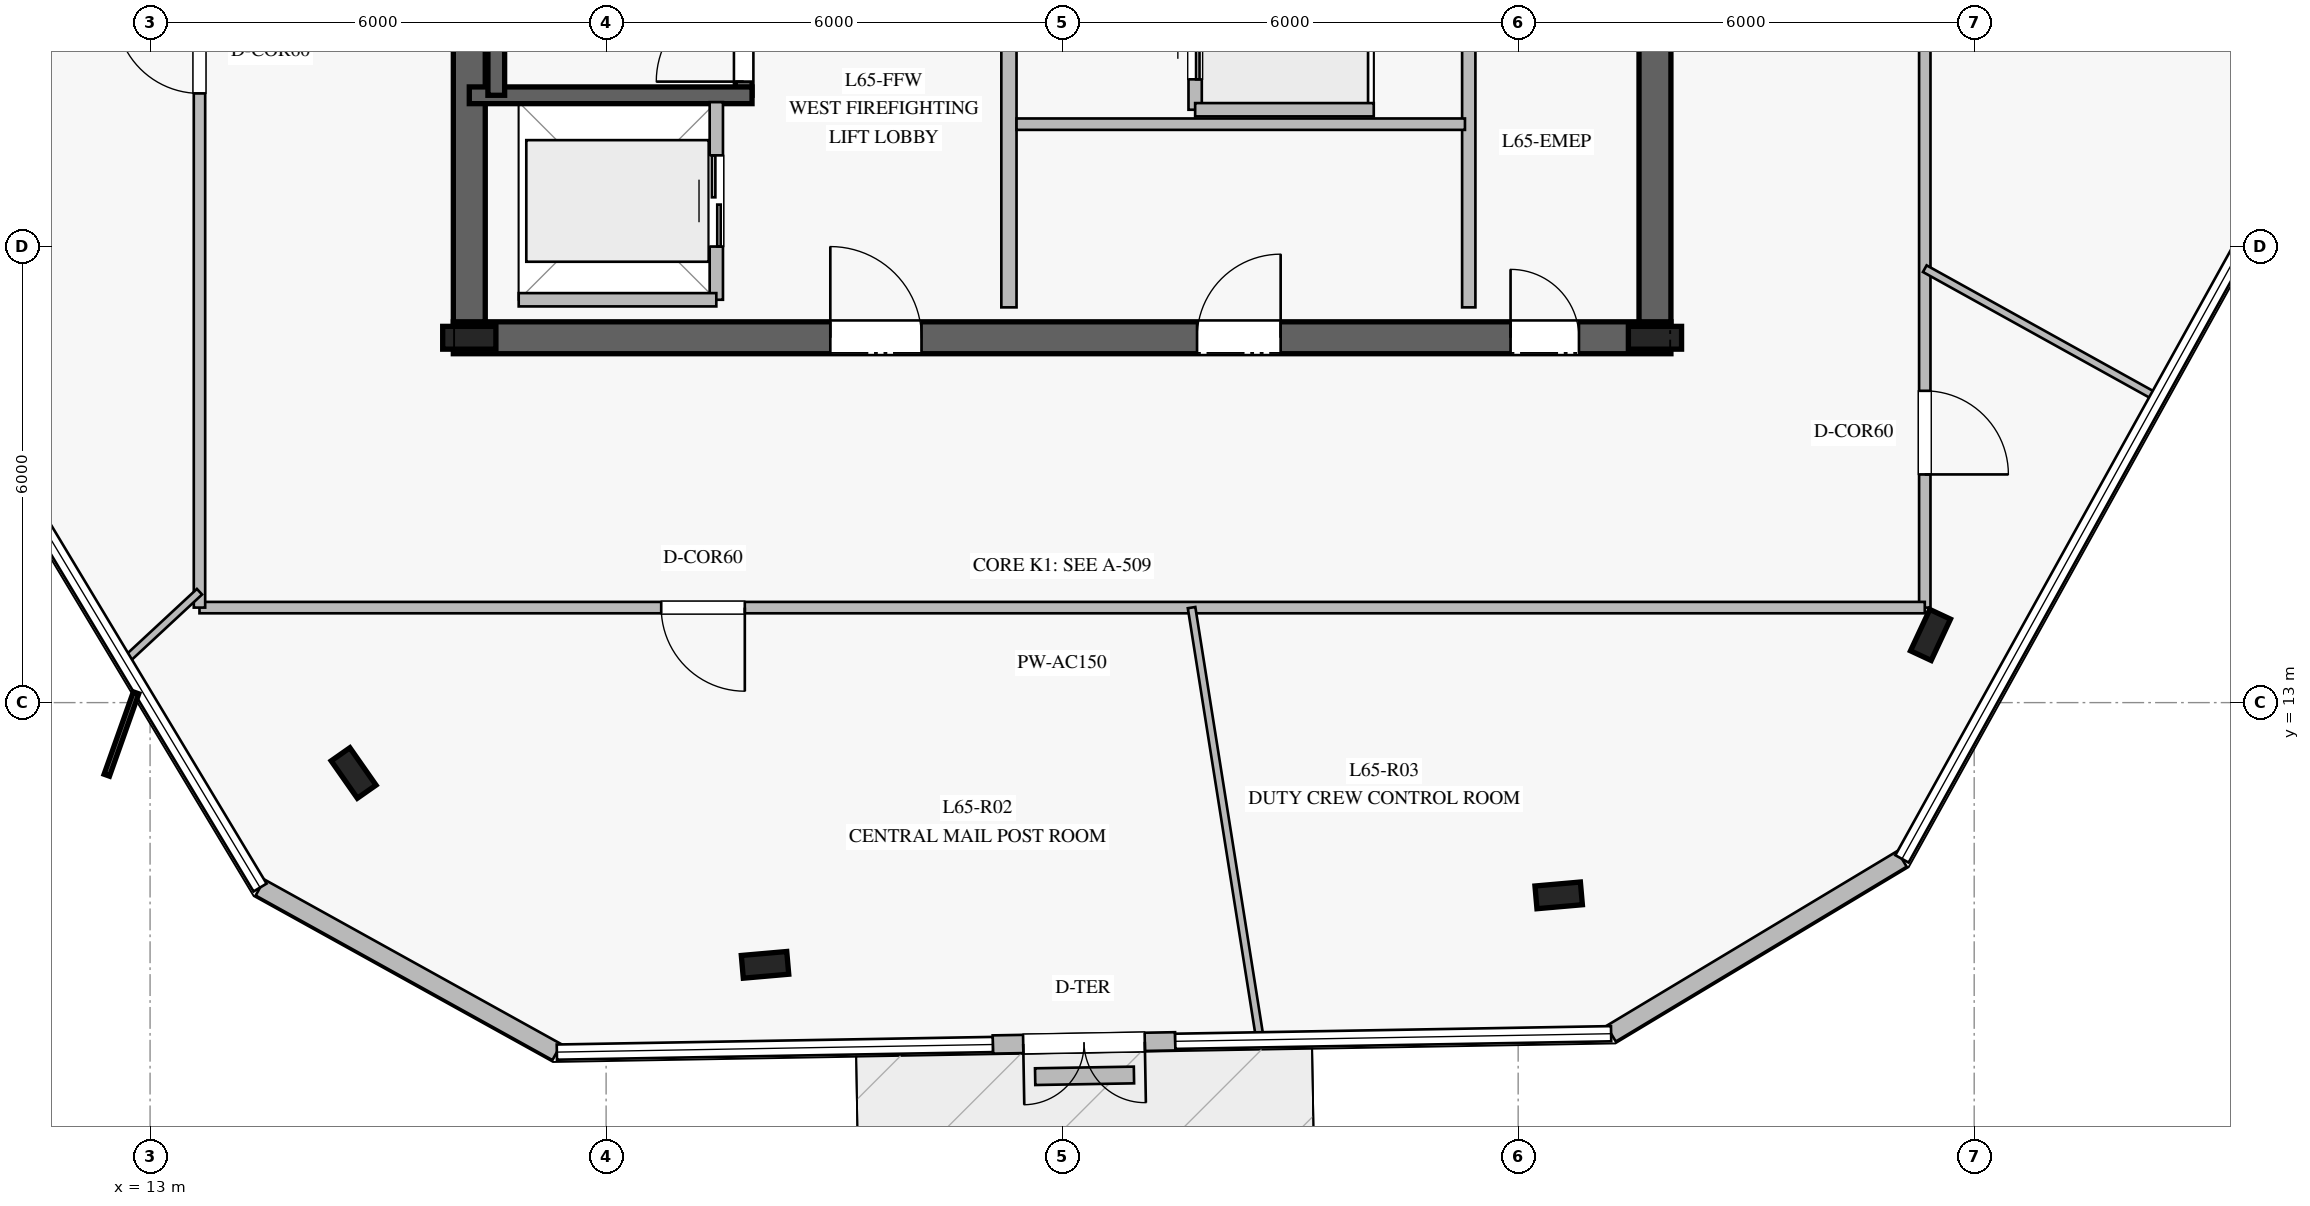
"""IFC4 building model, lengths in metres.
Left out: names, types, materials, properties, quantities, classifications, styles, units other than length and angle.
Written with IfcOpenShell. Run it as: python <this file> out.ifc"""

import sys

from ifc_helpers import new_model, si_unit, direction, frame, frame_2d, origin, origin_2d, place, context, subcontext, project, spatial, rectangle, i_section, extrude, element, fill, save


model = new_model("IFC4")
c1 = context("Model", 3, precision=1e-05, world=origin(), true_north=direction((0.0, 1.0)))
c2 = subcontext(c1, "Body", "Model", "MODEL_VIEW")
j1 = project(units=[si_unit("LENGTHUNIT", "METRE"), si_unit("PLANEANGLEUNIT", "RADIAN")], contexts=[c1])
p1 = place(None, origin())
s1 = spatial("IfcSite", under=j1, at=p1, CompositionType="ELEMENT")
p2 = place(p1, origin())
s2 = spatial("IfcBuilding", under=s1, at=p2, CompositionType="ELEMENT")
p3 = place(p2, frame((0.0, 0.0, 270.2)))
s3 = spatial("IfcBuildingStorey", under=s2, at=p3, CompositionType="ELEMENT", Elevation=270.2)
p4 = place(p3, frame((16.99, 17.8, 0.0), z_axis=(0.0, 0.0, 1.0), x_axis=(1.0, 0.0, 0.0)))
e1 = element("IfcWall", 1, at=p4, inside=s3, PredefinedType="SHEAR", context=c2, shape_type="SweptSolid", body=[
    extrude(rectangle(XDim=16.02, YDim=0.42, at=frame_2d((8.01, 0.0))), origin(), (0.0, 0.0, 1.0), 3.78),
])
p5 = place(p4, frame((4.96, 0.0, 0.0)))
e2 = element("IfcOpeningElement", 2, at=p5, cuts=e1, PredefinedType="OPENING", context=c2, shape_type="SweptSolid", body=[
    extrude(rectangle(XDim=1.2, YDim=2.25, at=frame_2d((0.6, 1.125))), frame((0.0, 0.22, 0.0), z_axis=(0.0, -1.0, 0.0), x_axis=(1.0, 0.0, 0.0)), (0.0, 0.0, 1.0), 0.44),
])
p6 = place(p4, frame((13.91, 0.0, 0.0)))
e3 = element("IfcOpeningElement", 3, at=p6, cuts=e1, PredefinedType="OPENING", context=c2, shape_type="SweptSolid", body=[
    extrude(rectangle(XDim=0.9, YDim=2.1, at=frame_2d((0.45, 1.05))), frame((0.0, 0.22, 0.0), z_axis=(0.0, -1.0, 0.0), x_axis=(1.0, 0.0, 0.0)), (0.0, 0.0, 1.0), 0.44),
])
p7 = place(p4, frame((9.785, 0.0, 0.0)))
e4 = element("IfcOpeningElement", 4, at=p7, cuts=e1, PredefinedType="OPENING", context=c2, shape_type="SweptSolid", body=[
    extrude(rectangle(XDim=1.1, YDim=2.2, at=frame_2d((0.55, 1.1))), frame((0.0, 0.22, 0.0), z_axis=(0.0, -1.0, 0.0), x_axis=(1.0, 0.0, 0.0)), (0.0, 0.0, 1.0), 0.44),
])
p8 = place(p3, frame((17.2, 31.99, 0.0), z_axis=(0.0, 0.0, 1.0), x_axis=(0.0, -1.0, 0.0)))
e5 = element("IfcWall", 5, at=p8, inside=s3, PredefinedType="SHEAR", context=c2, shape_type="SweptSolid", body=[
    extrude(rectangle(XDim=13.98, YDim=0.42, at=frame_2d((6.99, 0.0))), origin(), (0.0, 0.0, 1.0), 3.78),
])
p9 = place(p8, frame((2.14, 0.0, 0.0)))
e6 = element("IfcOpeningElement", 6, at=p9, cuts=e5, PredefinedType="OPENING", context=c2, shape_type="SweptSolid", body=[
    extrude(rectangle(XDim=1.5, YDim=2.2, at=frame_2d((0.75, 1.1))), frame((0.0, 0.22, 0.0), z_axis=(0.0, -1.0, 0.0), x_axis=(1.0, 0.0, 0.0)), (0.0, 0.0, 1.0), 0.44),
])
p10 = place(p3, frame((32.8, 18.01, 0.0), z_axis=(0.0, 0.0, 1.0), x_axis=(0.0, 1.0, 0.0)))
e7 = element("IfcWall", 7, at=p10, inside=s3, PredefinedType="SHEAR", context=c2, shape_type="SweptSolid", body=[
    extrude(rectangle(XDim=13.98, YDim=0.42, at=frame_2d((6.99, 0.0))), origin(), (0.0, 0.0, 1.0), 3.78),
])
for number, where, z_axis, x_axis in (
    (8, (17.2, 17.8, 0.0), (0.0, 0.0, 1.0), (1.0, 0.0, 0.0)),
    (9, (32.8, 17.8, 0.0), (0.0, 0.0, 1.0), (1.0, 0.0, 0.0)),
):
    element("IfcColumn", number, at=place(p3, frame(where, z_axis=z_axis, x_axis=x_axis)), inside=s3, PredefinedType="COLUMN", context=c2, shape_type="SweptSolid", body=[
        extrude(i_section(OverallWidth=0.3, OverallDepth=0.7, WebThickness=0.017, FlangeThickness=0.032, at=origin_2d()), origin(), (0.0, 0.0, 1.0), 4.0),
    ])
p11 = place(p3, frame((20.81, 20.99, 0.0), z_axis=(0.0, 0.0, 1.0), x_axis=(0.0, 1.0, 0.0)))
e10 = element("IfcWall", 10, at=p11, inside=s3, PredefinedType="SOLIDWALL", context=c2, shape_type="SweptSolid", body=[
    extrude(rectangle(XDim=7.22, YDim=0.22, at=frame_2d((3.61, 0.0))), origin(), (0.0, 0.0, 1.0), 3.78),
])
p12 = place(p11, frame((0.18, 0.0, 0.0)))
e11 = element("IfcOpeningElement", 11, at=p12, cuts=e10, PredefinedType="OPENING", context=c2, shape_type="SweptSolid", body=[
    extrude(rectangle(XDim=1.15, YDim=2.2, at=frame_2d((0.575, 1.1))), frame((0.0, 0.12, 0.0), z_axis=(0.0, -1.0, 0.0), x_axis=(1.0, 0.0, 0.0)), (0.0, 0.0, 1.0), 0.24),
])
p13 = place(p3, frame((17.2, 20.99, 0.0), z_axis=(0.0, 0.0, 1.0), x_axis=(1.0, 0.0, 0.0)))
e12 = element("IfcWall", 12, at=p13, inside=s3, PredefinedType="SOLIDWALL", context=c2, shape_type="SweptSolid", body=[
    extrude(rectangle(XDim=3.72, YDim=0.22, at=frame_2d((1.86, 0.0))), origin(), (0.0, 0.0, 1.0), 3.78),
])
p14 = place(p3, frame((17.555, 28.21, 0.0), z_axis=(0.0, 0.0, 1.0), x_axis=(0.0, -1.0, 0.0)))
e13 = element("IfcWall", 13, at=p14, inside=s3, PredefinedType="SOLIDWALL", context=c2, shape_type="SweptSolid", body=[
    extrude(rectangle(XDim=7.22, YDim=0.22, at=frame_2d((3.61, 0.0))), origin(), (0.0, 0.0, 1.0), 3.78),
])
for number, where, z_axis, x_axis in (
    (14, (15.678, 12.074, 0.0), (0.0, 0.0, 1.0), (-0.574, 0.819, 0.0)),
    (15, (21.091, 9.55, 0.0), (0.0, 0.0, 1.0), (0.996, 0.087, 0.0)),
    (16, (31.533, 10.464, 0.0), (0.0, 0.0, 1.0), (0.996, 0.087, 0.0)),
    (17, (36.425, 13.89, 0.0), (0.0, 0.0, 1.0), (0.423, 0.906, 0.0)),
):
    element("IfcColumn", number, at=place(p3, frame(where, z_axis=z_axis, x_axis=x_axis)), inside=s3, PredefinedType="COLUMN", context=c2, shape_type="SweptSolid", body=[
        extrude(i_section(OverallWidth=0.3, OverallDepth=0.6, WebThickness=0.015, FlangeThickness=0.03, at=origin_2d()), origin(), (0.0, 0.0, 1.0), 4.0),
    ])
p15 = place(p3, frame((14.447, 10.567, 0.0), z_axis=(0.0, 0.0, 1.0), x_axis=(0.874600538514, -0.48484419975, 0.0)))
e18 = element("IfcWall", 18, at=p15, inside=s3, PredefinedType="STANDARD", context=c2, shape_type="SweptSolid", body=[
    extrude(rectangle(XDim=4.465, YDim=0.24, at=frame_2d((2.232, 0.0))), origin(), (0.0, 0.0, 1.0), 3.78),
])
p16 = place(p3, frame((24.088, 8.502, 0.0), z_axis=(0.0, 0.0, 1.0), x_axis=(0.999846985771, 0.017492999853, 0.0)))
e19 = element("IfcWall", 19, at=p16, inside=s3, PredefinedType="STANDARD", context=c2, shape_type="SweptSolid", body=[
    extrude(rectangle(XDim=2.401, YDim=0.24, at=frame_2d((1.2, 0.0))), origin(), (0.0, 0.0, 1.0), 3.78),
])
p17 = place(p16, frame((0.4, 0.0, 0.0)))
e20 = element("IfcOpeningElement", 20, at=p17, cuts=e19, PredefinedType="OPENING", context=c2, shape_type="SweptSolid", body=[
    extrude(rectangle(XDim=1.6, YDim=2.25, at=frame_2d((0.8, 1.125))), frame((0.0, 0.13, 0.0), z_axis=(0.0, -1.0, 0.0), x_axis=(1.0, 0.0, 0.0)), (0.0, 0.0, 1.0), 0.26),
])
p18 = place(p3, frame((32.223, 8.644, 0.0), z_axis=(0.0, 0.0, 1.0), x_axis=(0.857121218243, 0.515114761231, 0.0)))
e21 = element("IfcWall", 21, at=p18, inside=s3, PredefinedType="STANDARD", context=c2, shape_type="SweptSolid", body=[
    extrude(rectangle(XDim=4.465, YDim=0.24, at=frame_2d((2.232, 0.0))), origin(), (0.0, 0.0, 1.0), 3.78),
])
p19 = place(p3, frame((24.645, 8.079, 0.0), z_axis=(0.0, 0.0, 1.0), x_axis=(0.999857201789, 0.01689899496, 0.0)))
e22 = element("IfcWall", 22, at=p19, inside=s3, PredefinedType="USERDEFINED", context=c2, shape_type="SweptSolid", body=[
    extrude(rectangle(XDim=1.3, YDim=0.22, at=frame_2d((0.65, 0.0))), origin(), (0.0, 0.0, 1.0), 0.4),
])
p20 = place(p3, frame((24.3, 18.2, 0.0), z_axis=(0.0, 0.0, 1.0), x_axis=(0.0, 1.0, 0.0)))
e23 = element("IfcWall", 23, at=p20, inside=s3, PredefinedType="PARTITIONING", context=c2, shape_type="SweptSolid", body=[
    extrude(rectangle(XDim=5.15, YDim=0.2, at=frame_2d((2.575, 0.0))), origin(), (0.0, 0.0, 1.0), 3.78),
])
p21 = place(p3, frame((30.35, 18.2, 0.0), z_axis=(0.0, 0.0, 1.0), x_axis=(0.0, 1.0, 0.0)))
e24 = element("IfcWall", 24, at=p21, inside=s3, PredefinedType="PARTITIONING", context=c2, shape_type="SweptSolid", body=[
    extrude(rectangle(XDim=3.48, YDim=0.175, at=frame_2d((1.74, 0.0))), origin(), (0.0, 0.0, 1.0), 3.78),
])
p22 = place(p3, frame((24.4, 20.61, 0.0), z_axis=(0.0, 0.0, 1.0), x_axis=(1.0, 0.0, 0.0)))
e25 = element("IfcWall", 25, at=p22, inside=s3, PredefinedType="PARTITIONING", context=c2, shape_type="SweptSolid", body=[
    extrude(rectangle(XDim=5.9, YDim=0.15, at=frame_2d((2.95, 0.0))), origin(), (0.0, 0.0, 1.0), 3.78),
])
p23 = place(p3, frame((26.75, 20.8, 0.0), z_axis=(0.0, 0.0, 1.0), x_axis=(0.0, 1.0, 0.0)))
e26 = element("IfcWall", 26, at=p23, inside=s3, PredefinedType="PARTITIONING", context=c2, shape_type="SweptSolid", body=[
    extrude(rectangle(XDim=1.9, YDim=0.175, at=frame_2d((0.95, 0.0))), origin(), (0.0, 0.0, 1.0), 3.78),
])
p24 = place(p23, frame((0.4, 0.0, 0.0)))
e27 = element("IfcOpeningElement", 27, at=p24, cuts=e26, PredefinedType="OPENING", context=c2, shape_type="SweptSolid", body=[
    extrude(rectangle(XDim=1.1, YDim=2.2, at=frame_2d((0.55, 1.1))), frame((0.0, 0.098, 0.0), z_axis=(0.0, -1.0, 0.0), x_axis=(1.0, 0.0, 0.0)), (0.0, 0.0, 1.0), 0.195),
])
p25 = place(p3, frame((26.75, 20.8, 0.0), z_axis=(0.0, 0.0, 1.0), x_axis=(1.0, 0.0, 0.0)))
e28 = element("IfcWall", 28, at=p25, inside=s3, PredefinedType="PARTITIONING", context=c2, shape_type="SweptSolid", body=[
    extrude(rectangle(XDim=2.35, YDim=0.175, at=frame_2d((1.175, 0.0))), origin(), (0.0, 0.0, 1.0), 3.78),
])
p26 = place(p3, frame((20.45, 18.3, 0.0), z_axis=(0.0, 0.0, 1.0), x_axis=(0.0, 1.0, 0.0)))
e29 = element("IfcWall", 29, at=p26, inside=s3, PredefinedType="PARTITIONING", context=c2, shape_type="SweptSolid", body=[
    extrude(rectangle(XDim=2.6, YDim=0.175, at=frame_2d((1.3, 0.0))), origin(), (0.0, 0.0, 1.0), 3.78),
])
p27 = place(p26, frame((0.7, 0.0, 0.0)))
e30 = element("IfcOpeningElement", 30, at=p27, cuts=e29, PredefinedType="OPENING", context=c2, shape_type="SweptSolid", body=[
    extrude(rectangle(XDim=1.2, YDim=2.2, at=frame_2d((0.6, 1.1))), frame((0.0, 0.098, 0.0), z_axis=(0.0, -1.0, 0.0), x_axis=(1.0, 0.0, 0.0)), (0.0, 0.0, 1.0), 0.195),
])
p28 = place(p3, frame((17.85, 18.3, 0.0), z_axis=(0.0, 0.0, 1.0), x_axis=(1.0, 0.0, 0.0)))
e31 = element("IfcWall", 31, at=p28, inside=s3, PredefinedType="PARTITIONING", context=c2, shape_type="SweptSolid", body=[
    extrude(rectangle(XDim=2.6, YDim=0.175, at=frame_2d((1.3, 0.0))), origin(), (0.0, 0.0, 1.0), 3.78),
])
p29 = place(p3, frame((36.35, 35.75, 0.0), z_axis=(0.0, 0.0, 1.0), x_axis=(0.0, -1.0, 0.0)))
e32 = element("IfcWall", 32, at=p29, inside=s3, PredefinedType="PARTITIONING", context=c2, shape_type="SweptSolid", body=[
    extrude(rectangle(XDim=21.5, YDim=0.15, at=frame_2d((10.75, 0.0))), origin(), (0.0, 0.0, 1.0), 3.25),
])
p30 = place(p29, frame((18.648, 0.0, 0.0)))
e33 = element("IfcOpeningElement", 33, at=p30, cuts=e32, PredefinedType="OPENING", context=c2, shape_type="SweptSolid", body=[
    extrude(rectangle(XDim=1.1, YDim=2.2, at=frame_2d((0.55, 1.1))), frame((0.0, 0.085, 0.0), z_axis=(0.0, -1.0, 0.0), x_axis=(1.0, 0.0, 0.0)), (0.0, 0.0, 1.0), 0.17),
])
p31 = place(p29, frame((9.933, 0.0, 0.0)))
e34 = element("IfcOpeningElement", 34, at=p31, cuts=e32, PredefinedType="OPENING", context=c2, shape_type="SweptSolid", body=[
    extrude(rectangle(XDim=1.1, YDim=2.2, at=frame_2d((0.55, 1.1))), frame((0.0, 0.085, 0.0), z_axis=(0.0, -1.0, 0.0), x_axis=(1.0, 0.0, 0.0)), (0.0, 0.0, 1.0), 0.17),
])
p32 = place(p3, frame((36.35, 14.25, 0.0), z_axis=(0.0, 0.0, 1.0), x_axis=(-1.0, 0.0, 0.0)))
e35 = element("IfcWall", 35, at=p32, inside=s3, PredefinedType="PARTITIONING", context=c2, shape_type="SweptSolid", body=[
    extrude(rectangle(XDim=22.7, YDim=0.15, at=frame_2d((11.35, 0.0))), origin(), (0.0, 0.0, 1.0), 3.28),
])
p33 = place(p32, frame((15.525, 0.0, 0.0)))
e36 = element("IfcOpeningElement", 36, at=p33, cuts=e35, PredefinedType="OPENING", context=c2, shape_type="SweptSolid", body=[
    extrude(rectangle(XDim=1.1, YDim=2.2, at=frame_2d((0.55, 1.1))), frame((0.0, 0.085, 0.0), z_axis=(0.0, -1.0, 0.0), x_axis=(1.0, 0.0, 0.0)), (0.0, 0.0, 1.0), 0.17),
])
p34 = place(p3, frame((13.65, 14.25, 0.0), z_axis=(0.0, 0.0, 1.0), x_axis=(0.0, 1.0, 0.0)))
e37 = element("IfcWall", 37, at=p34, inside=s3, PredefinedType="PARTITIONING", context=c2, shape_type="SweptSolid", body=[
    extrude(rectangle(XDim=21.5, YDim=0.15, at=frame_2d((10.75, 0.0))), origin(), (0.0, 0.0, 1.0), 3.25),
])
p35 = place(p34, frame((6.765, 0.0, 0.0)))
e38 = element("IfcOpeningElement", 38, at=p35, cuts=e37, PredefinedType="OPENING", context=c2, shape_type="SweptSolid", body=[
    extrude(rectangle(XDim=1.1, YDim=2.2, at=frame_2d((0.55, 1.1))), frame((0.0, 0.085, 0.0), z_axis=(0.0, -1.0, 0.0), x_axis=(1.0, 0.0, 0.0)), (0.0, 0.0, 1.0), 0.17),
])
p36 = place(p3, frame((13.65, 14.459, 0.0), z_axis=(0.0, 0.0, 1.0), x_axis=(-0.732786974923, -0.680458117288, 0.0)))
e39 = element("IfcWall", 39, at=p36, inside=s3, PredefinedType="MOVABLE", context=c2, shape_type="SweptSolid", body=[
    extrude(rectangle(XDim=1.334, YDim=0.1, at=frame_2d((0.667, 0.0))), origin(), (0.0, 0.0, 1.0), 3.28),
])
p37 = place(p3, frame((26.703, 14.25, 0.0), z_axis=(0.0, 0.0, 1.0), x_axis=(0.156602299035, -0.987661743684, 0.0)))
e40 = element("IfcWall", 40, at=p37, inside=s3, PredefinedType="MOVABLE", context=c2, shape_type="SweptSolid", body=[
    extrude(rectangle(XDim=5.742, YDim=0.1, at=frame_2d((2.871, 0.0))), origin(), (0.0, 0.0, 1.0), 3.28),
])
p38 = place(p3, frame((36.35, 18.709, 0.0), z_axis=(0.0, 0.0, 1.0), x_axis=(0.874507187931, -0.485012554741, 0.0)))
e41 = element("IfcWall", 41, at=p38, inside=s3, PredefinedType="MOVABLE", context=c2, shape_type="SweptSolid", body=[
    extrude(rectangle(XDim=3.486, YDim=0.1, at=frame_2d((1.743, 0.0))), origin(), (0.0, 0.0, 1.0), 3.28),
])
p39 = place(p17, frame((1.6, 0.0, 0.0), z_axis=(0.0, 0.0, 1.0), x_axis=(-1.0, 0.0, 0.0)))
e42 = element("IfcDoor", 42, at=p39, inside=s3, OperationType="DOUBLE_DOOR_SINGLE_SWING", PredefinedType="DOOR", context=c2, shape_type="SweptSolid", body=[
    extrude(rectangle(XDim=1.6, YDim=2.25, at=frame_2d((0.8, 1.125))), frame((0.0, 0.025, 0.0), z_axis=(0.0, -1.0, 0.0), x_axis=(1.0, 0.0, 0.0)), (0.0, 0.0, 1.0), 0.05),
])
fill(e20, e42)
p40 = place(p12, origin())
e43 = element("IfcDoor", 43, at=p40, inside=s3, OperationType="SINGLE_SWING_LEFT", PredefinedType="DOOR", context=c2, shape_type="SweptSolid", body=[
    extrude(rectangle(XDim=1.15, YDim=2.2, at=frame_2d((0.575, 1.1))), frame((0.0, 0.025, 0.0), z_axis=(0.0, -1.0, 0.0), x_axis=(1.0, 0.0, 0.0)), (0.0, 0.0, 1.0), 0.05),
])
fill(e11, e43)
p41 = place(p5, origin())
e44 = element("IfcDoor", 44, at=p41, inside=s3, OperationType="SINGLE_SWING_LEFT", PredefinedType="DOOR", context=c2, shape_type="SweptSolid", body=[
    extrude(rectangle(XDim=1.2, YDim=2.25, at=frame_2d((0.6, 1.125))), frame((0.0, 0.025, 0.0), z_axis=(0.0, -1.0, 0.0), x_axis=(1.0, 0.0, 0.0)), (0.0, 0.0, 1.0), 0.05),
])
fill(e2, e44)
p42 = place(p6, origin())
e45 = element("IfcDoor", 45, at=p42, inside=s3, OperationType="SINGLE_SWING_LEFT", PredefinedType="DOOR", context=c2, shape_type="SweptSolid", body=[
    extrude(rectangle(XDim=0.9, YDim=2.1, at=frame_2d((0.45, 1.05))), frame((0.0, 0.025, 0.0), z_axis=(0.0, -1.0, 0.0), x_axis=(1.0, 0.0, 0.0)), (0.0, 0.0, 1.0), 0.05),
])
fill(e3, e45)
p43 = place(p7, origin())
e46 = element("IfcDoor", 46, at=p43, inside=s3, OperationType="SINGLE_SWING_RIGHT", PredefinedType="DOOR", context=c2, shape_type="SweptSolid", body=[
    extrude(rectangle(XDim=1.1, YDim=2.2, at=frame_2d((0.55, 1.1))), frame((0.0, 0.025, 0.0), z_axis=(0.0, -1.0, 0.0), x_axis=(1.0, 0.0, 0.0)), (0.0, 0.0, 1.0), 0.05),
])
fill(e4, e46)
p44 = place(p24, origin())
e47 = element("IfcDoor", 47, at=p44, inside=s3, OperationType="DOUBLE_DOOR_SLIDING", PredefinedType="DOOR", context=c2, shape_type="SweptSolid", body=[
    extrude(rectangle(XDim=1.1, YDim=2.2, at=frame_2d((0.55, 1.1))), frame((0.0, 0.025, 0.0), z_axis=(0.0, -1.0, 0.0), x_axis=(1.0, 0.0, 0.0)), (0.0, 0.0, 1.0), 0.05),
])
fill(e27, e47)
p45 = place(p27, origin())
e48 = element("IfcDoor", 48, at=p45, inside=s3, OperationType="DOUBLE_DOOR_SLIDING", PredefinedType="DOOR", context=c2, shape_type="SweptSolid", body=[
    extrude(rectangle(XDim=1.2, YDim=2.2, at=frame_2d((0.6, 1.1))), frame((0.0, 0.025, 0.0), z_axis=(0.0, -1.0, 0.0), x_axis=(1.0, 0.0, 0.0)), (0.0, 0.0, 1.0), 0.05),
])
fill(e30, e48)
p46 = place(p35, origin())
e49 = element("IfcDoor", 49, at=p46, inside=s3, OperationType="SINGLE_SWING_RIGHT", PredefinedType="DOOR", context=c2, shape_type="SweptSolid", body=[
    extrude(rectangle(XDim=1.1, YDim=2.2, at=frame_2d((0.55, 1.1))), frame((0.0, 0.025, 0.0), z_axis=(0.0, -1.0, 0.0), x_axis=(1.0, 0.0, 0.0)), (0.0, 0.0, 1.0), 0.05),
])
fill(e38, e49)
p47 = place(p33, origin())
e50 = element("IfcDoor", 50, at=p47, inside=s3, OperationType="SINGLE_SWING_LEFT", PredefinedType="DOOR", context=c2, shape_type="SweptSolid", body=[
    extrude(rectangle(XDim=1.1, YDim=2.2, at=frame_2d((0.55, 1.1))), frame((0.0, 0.025, 0.0), z_axis=(0.0, -1.0, 0.0), x_axis=(1.0, 0.0, 0.0)), (0.0, 0.0, 1.0), 0.05),
])
fill(e36, e50)
p48 = place(p30, origin())
e51 = element("IfcDoor", 51, at=p48, inside=s3, OperationType="SINGLE_SWING_RIGHT", PredefinedType="DOOR", context=c2, shape_type="SweptSolid", body=[
    extrude(rectangle(XDim=1.1, YDim=2.2, at=frame_2d((0.55, 1.1))), frame((0.0, 0.025, 0.0), z_axis=(0.0, -1.0, 0.0), x_axis=(1.0, 0.0, 0.0)), (0.0, 0.0, 1.0), 0.05),
])
fill(e33, e51)
save(model, sys.argv[1])
